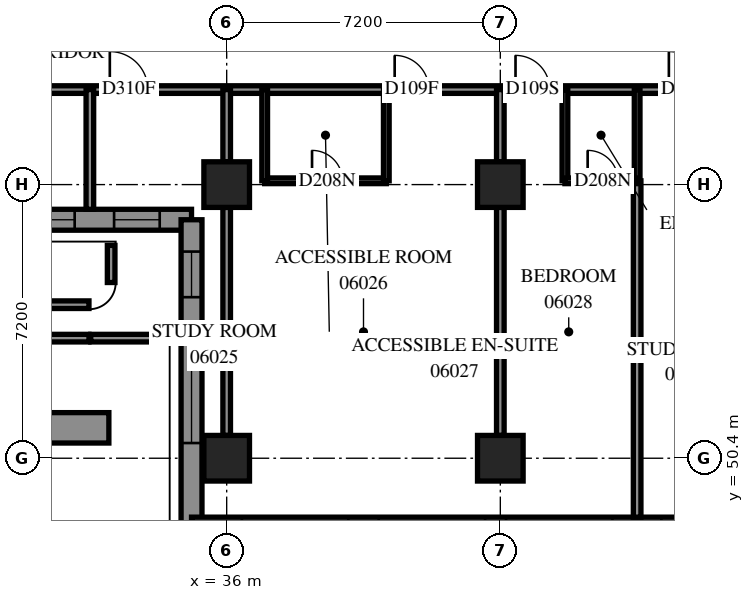
"""IFC4 building model, lengths in metres.
Left out: names, types, materials, properties, quantities, classifications, styles, units other than length and angle.
Written with IfcOpenShell. Run it as: python <this file> out.ifc"""

import sys

from ifc_helpers import new_model, si_unit, direction, frame, frame_2d, origin, origin_2d, place, context, subcontext, project, spatial, polyline, rectangle, outline, extrude, element, fill, save


model = new_model("IFC4")
c1 = context("Model", 3, precision=1e-05, world=origin(), true_north=direction((0.0, 1.0)))
c2 = subcontext(c1, "Body", "Model", "MODEL_VIEW")
j1 = project(units=[si_unit("LENGTHUNIT", "METRE"), si_unit("PLANEANGLEUNIT", "RADIAN")], contexts=[c1])
p1 = place(None, origin())
s1 = spatial("IfcSite", under=j1, at=p1, CompositionType="ELEMENT")
p2 = place(p1, origin())
s2 = spatial("IfcBuilding", under=s1, at=p2, CompositionType="ELEMENT")
p3 = place(p2, frame((0.0, 0.0, 27.0)))
s3 = spatial("IfcBuildingStorey", under=s2, at=p3, CompositionType="ELEMENT", Elevation=27.0)
for number, where, z_axis, x_axis in (
    (1, (36.0, 50.4, 0.0), (0.0, 0.0, 1.0), (1.0, 0.0, 0.0)),
    (2, (36.0, 57.6, 0.0), (0.0, 0.0, 1.0), (1.0, 0.0, 0.0)),
    (3, (43.2, 50.4, 0.0), (0.0, 0.0, 1.0), (1.0, 0.0, 0.0)),
    (4, (43.2, 57.6, 0.0), (0.0, 0.0, 1.0), (1.0, 0.0, 0.0)),
):
    element("IfcColumn", number, at=place(p3, frame(where, z_axis=z_axis, x_axis=x_axis)), inside=s3, PredefinedType="COLUMN", context=c2, shape_type="SweptSolid", body=[
        extrude(rectangle(XDim=1.2, YDim=1.2, at=origin_2d()), origin(), (0.0, 0.0, 1.0), 3.1),
    ])
p4 = place(p3, frame((27.875, 56.675, 0.0), z_axis=(0.0, 0.0, 1.0), x_axis=(1.0, 0.0, 0.0)))
e5 = element("IfcWall", 5, at=p4, inside=s3, PredefinedType="SOLIDWALL", context=c2, shape_type="SweptSolid", body=[
    extrude(outline(polyline([(-0.275, -0.275), (6.925, -0.275), (7.475, 0.275), (0.275, 0.275), (-0.275, -0.275)])), origin(), (0.0, 0.0, 1.0), 3.1),
])
p5 = place(p4, frame((1.325, 0.0, 0.5)))
e6 = element("IfcOpeningElement", 6, at=p5, cuts=e5, PredefinedType="OPENING", context=c2, shape_type="SweptSolid", body=[
    extrude(rectangle(XDim=2.8, YDim=2.45, at=frame_2d((1.4, 1.225))), frame((0.0, 0.285, 0.0), z_axis=(0.0, -1.0, 0.0), x_axis=(1.0, 0.0, 0.0)), (0.0, 0.0, 1.0), 0.57),
])
p6 = place(p4, frame((5.162, 0.0, 0.5)))
e7 = element("IfcOpeningElement", 7, at=p6, cuts=e5, PredefinedType="OPENING", context=c2, shape_type="SweptSolid", body=[
    extrude(rectangle(XDim=1.2, YDim=2.45, at=frame_2d((0.6, 1.225))), frame((0.0, 0.285, 0.0), z_axis=(0.0, -1.0, 0.0), x_axis=(1.0, 0.0, 0.0)), (0.0, 0.0, 1.0), 0.57),
])
p7 = place(p3, frame((35.075, 56.675, 0.0), z_axis=(0.0, 0.0, 1.0), x_axis=(0.0, -1.0, 0.0)))
e8 = element("IfcWall", 8, at=p7, inside=s3, PredefinedType="SOLIDWALL", context=c2, shape_type="SweptSolid", body=[
    extrude(outline(polyline([(0.275, -0.275), (8.375, -0.275), (7.825, 0.275), (-0.275, 0.275), (0.275, -0.275)])), origin(), (0.0, 0.0, 1.0), 3.1),
])
p8 = place(p7, frame((3.075, 0.0, 0.5)))
e9 = element("IfcOpeningElement", 9, at=p8, cuts=e8, PredefinedType="OPENING", context=c2, shape_type="SweptSolid", body=[
    extrude(rectangle(XDim=2.8, YDim=2.45, at=frame_2d((1.4, 1.225))), frame((0.0, 0.285, 0.0), z_axis=(0.0, -1.0, 0.0), x_axis=(1.0, 0.0, 0.0)), (0.0, 0.0, 1.0), 0.57),
])
p9 = place(p7, frame((0.838, 0.0, 0.5)))
e10 = element("IfcOpeningElement", 10, at=p9, cuts=e8, PredefinedType="OPENING", context=c2, shape_type="SweptSolid", body=[
    extrude(rectangle(XDim=1.2, YDim=2.45, at=frame_2d((0.6, 1.225))), frame((0.0, 0.285, 0.0), z_axis=(0.0, -1.0, 0.0), x_axis=(1.0, 0.0, 0.0)), (0.0, 0.0, 1.0), 0.57),
])
p10 = place(p3, frame((35.075, 48.575, 0.0), z_axis=(0.0, 0.0, 1.0), x_axis=(1.0, 0.0, 0.0)))
e11 = element("IfcWall", 11, at=p10, inside=s3, PredefinedType="SOLIDWALL", context=c2, shape_type="SweptSolid", body=[
    extrude(outline(polyline([(-0.275, -0.275), (14.125, -0.275), (14.675, 0.275), (0.275, 0.275), (-0.275, -0.275)])), origin(), (0.0, 0.0, 1.0), 3.1),
])
p11 = place(p10, frame((1.325, 0.0, 0.5)))
e12 = element("IfcOpeningElement", 12, at=p11, cuts=e11, PredefinedType="OPENING", context=c2, shape_type="SweptSolid", body=[
    extrude(rectangle(XDim=2.8, YDim=2.45, at=frame_2d((1.4, 1.225))), frame((0.0, 0.285, 0.0), z_axis=(0.0, -1.0, 0.0), x_axis=(1.0, 0.0, 0.0)), (0.0, 0.0, 1.0), 0.57),
])
p12 = place(p10, frame((4.925, 0.0, 0.5)))
e13 = element("IfcOpeningElement", 13, at=p12, cuts=e11, PredefinedType="OPENING", context=c2, shape_type="SweptSolid", body=[
    extrude(rectangle(XDim=2.8, YDim=2.45, at=frame_2d((1.4, 1.225))), frame((0.0, 0.285, 0.0), z_axis=(0.0, -1.0, 0.0), x_axis=(1.0, 0.0, 0.0)), (0.0, 0.0, 1.0), 0.57),
])
p13 = place(p10, frame((8.275, 0.0, 0.5)))
e14 = element("IfcOpeningElement", 14, at=p13, cuts=e11, PredefinedType="OPENING", context=c2, shape_type="SweptSolid", body=[
    extrude(rectangle(XDim=2.8, YDim=2.45, at=frame_2d((1.4, 1.225))), frame((0.0, 0.285, 0.0), z_axis=(0.0, -1.0, 0.0), x_axis=(1.0, 0.0, 0.0)), (0.0, 0.0, 1.0), 0.57),
])
p14 = place(p10, frame((12.363, 0.0, 0.5)))
e15 = element("IfcOpeningElement", 15, at=p14, cuts=e11, PredefinedType="OPENING", context=c2, shape_type="SweptSolid", body=[
    extrude(rectangle(XDim=1.2, YDim=2.45, at=frame_2d((0.6, 1.225))), frame((0.0, 0.285, 0.0), z_axis=(0.0, -1.0, 0.0), x_axis=(1.0, 0.0, 0.0)), (0.0, 0.0, 1.0), 0.57),
])
p15 = place(p3, frame((28.8, 60.1, 0.0), z_axis=(0.0, 0.0, 1.0), x_axis=(1.0, 0.0, 0.0)))
e16 = element("IfcWall", 16, at=p15, inside=s3, PredefinedType="PARTITIONING", context=c2, shape_type="SweptSolid", body=[
    extrude(rectangle(XDim=24.1, YDim=0.2, at=frame_2d((12.05, 0.0))), origin(), (0.0, 0.0, 1.0), 3.1),
])
p16 = place(p15, frame((4.125, 0.0, 0.0)))
e17 = element("IfcOpeningElement", 17, at=p16, cuts=e16, PredefinedType="OPENING", context=c2, shape_type="SweptSolid", body=[
    extrude(rectangle(XDim=1.0, YDim=2.1, at=frame_2d((0.5, 1.05))), frame((0.0, 0.11, 0.0), z_axis=(0.0, -1.0, 0.0), x_axis=(1.0, 0.0, 0.0)), (0.0, 0.0, 1.0), 0.22),
])
p17 = place(p15, frame((11.62, 0.0, 0.0)))
e18 = element("IfcOpeningElement", 18, at=p17, cuts=e16, PredefinedType="OPENING", context=c2, shape_type="SweptSolid", body=[
    extrude(rectangle(XDim=0.9, YDim=2.1, at=frame_2d((0.45, 1.05))), frame((0.0, 0.11, 0.0), z_axis=(0.0, -1.0, 0.0), x_axis=(1.0, 0.0, 0.0)), (0.0, 0.0, 1.0), 0.22),
])
p18 = place(p15, frame((14.8, 0.0, 0.0)))
e19 = element("IfcOpeningElement", 19, at=p18, cuts=e16, PredefinedType="OPENING", context=c2, shape_type="SweptSolid", body=[
    extrude(rectangle(XDim=0.9, YDim=2.1, at=frame_2d((0.45, 1.05))), frame((0.0, 0.11, 0.0), z_axis=(0.0, -1.0, 0.0), x_axis=(1.0, 0.0, 0.0)), (0.0, 0.0, 1.0), 0.22),
])
p19 = place(p15, frame((18.835, 0.0, 0.0)))
e20 = element("IfcOpeningElement", 20, at=p19, cuts=e16, PredefinedType="OPENING", context=c2, shape_type="SweptSolid", body=[
    extrude(rectangle(XDim=1.0, YDim=2.1, at=frame_2d((0.5, 1.05))), frame((0.0, 0.11, 0.0), z_axis=(0.0, -1.0, 0.0), x_axis=(1.0, 0.0, 0.0)), (0.0, 0.0, 1.0), 0.22),
])
p20 = place(p15, frame((22.854, 0.0, 0.0)))
e21 = element("IfcOpeningElement", 21, at=p20, cuts=e16, PredefinedType="OPENING", context=c2, shape_type="SweptSolid", body=[
    extrude(rectangle(XDim=1.0, YDim=2.1, at=frame_2d((0.5, 1.05))), frame((0.0, 0.11, 0.0), z_axis=(0.0, -1.0, 0.0), x_axis=(1.0, 0.0, 0.0)), (0.0, 0.0, 1.0), 0.22),
])
p21 = place(p3, frame((46.8, 48.85, 0.0), z_axis=(0.0, 0.0, 1.0), x_axis=(0.0, 1.0, 0.0)))
e22 = element("IfcWall", 22, at=p21, inside=s3, PredefinedType="PARTITIONING", context=c2, shape_type="SweptSolid", body=[
    extrude(rectangle(XDim=8.85, YDim=0.2, at=frame_2d((4.425, 0.0))), origin(), (0.0, 0.0, 1.0), 3.1),
])
p22 = place(p3, frame((36.0, 51.0, 0.0), z_axis=(0.0, 0.0, 1.0), x_axis=(0.0, 1.0, 0.0)))
e23 = element("IfcWall", 23, at=p22, inside=s3, PredefinedType="PARTITIONING", context=c2, shape_type="SweptSolid", body=[
    extrude(rectangle(XDim=6.0, YDim=0.2, at=frame_2d((3.0, 0.0))), origin(), (0.0, 0.0, 1.0), 2.6),
])
p23 = place(p3, frame((43.2, 51.0, 0.0), z_axis=(0.0, 0.0, 1.0), x_axis=(0.0, 1.0, 0.0)))
e24 = element("IfcWall", 24, at=p23, inside=s3, PredefinedType="PARTITIONING", context=c2, shape_type="SweptSolid", body=[
    extrude(rectangle(XDim=6.0, YDim=0.2, at=frame_2d((3.0, 0.0))), origin(), (0.0, 0.0, 1.0), 3.1),
])
p24 = place(p3, frame((37.0, 57.7, 0.0), z_axis=(0.0, 0.0, 1.0), x_axis=(1.0, 0.0, 0.0)))
e25 = element("IfcWall", 25, at=p24, inside=s3, PredefinedType="PARTITIONING", context=c2, shape_type="SweptSolid", body=[
    extrude(rectangle(XDim=3.2, YDim=0.15, at=frame_2d((1.6, 0.0))), origin(), (0.0, 0.0, 1.0), 3.1),
])
p25 = place(p24, frame((1.246, 0.0, 0.0)))
e26 = element("IfcOpeningElement", 26, at=p25, cuts=e25, PredefinedType="OPENING", context=c2, shape_type="SweptSolid", body=[
    extrude(rectangle(XDim=0.8, YDim=2.1, at=frame_2d((0.4, 1.05))), frame((0.0, 0.085, 0.0), z_axis=(0.0, -1.0, 0.0), x_axis=(1.0, 0.0, 0.0)), (0.0, 0.0, 1.0), 0.17),
])
p26 = place(p3, frame((32.4, 56.95, 0.0), z_axis=(0.0, 0.0, 1.0), x_axis=(0.0, 1.0, 0.0)))
e27 = element("IfcWall", 27, at=p26, inside=s3, PredefinedType="PARTITIONING", context=c2, shape_type="SweptSolid", body=[
    extrude(rectangle(XDim=3.15, YDim=0.2, at=frame_2d((1.575, 0.0))), origin(), (0.0, 0.0, 1.0), 3.1),
])
for number, where, z_axis, x_axis in (
    (28, (40.2, 57.7, 0.0), (0.0, 0.0, 1.0), (0.0, 1.0, 0.0)),
    (29, (37.0, 57.7, 0.0), (0.0, 0.0, 1.0), (0.0, 1.0, 0.0)),
    (30, (44.9, 57.7, 0.0), (0.0, 0.0, 1.0), (0.0, 1.0, 0.0)),
    (31, (46.8, 57.7, 0.0), (0.0, 0.0, 1.0), (0.0, 1.0, 0.0)),
):
    element("IfcWall", number, at=place(p3, frame(where, z_axis=z_axis, x_axis=x_axis)), inside=s3, PredefinedType="PARTITIONING", context=c2, shape_type="SweptSolid", body=[
        extrude(rectangle(XDim=2.4, YDim=0.15, at=frame_2d((1.2, 0.0))), origin(), (0.0, 0.0, 1.0), 3.1),
    ])
p27 = place(p3, frame((36.0, 58.2, 0.0), z_axis=(0.0, 0.0, 1.0), x_axis=(0.0, 1.0, 0.0)))
e32 = element("IfcWall", 32, at=p27, inside=s3, PredefinedType="PARTITIONING", context=c2, shape_type="SweptSolid", body=[
    extrude(rectangle(XDim=1.9, YDim=0.2, at=frame_2d((0.95, 0.0))), origin(), (0.0, 0.0, 1.0), 3.1),
])
p28 = place(p3, frame((44.9, 57.7, 0.0), z_axis=(0.0, 0.0, 1.0), x_axis=(1.0, 0.0, 0.0)))
e33 = element("IfcWall", 33, at=p28, inside=s3, PredefinedType="PARTITIONING", context=c2, shape_type="SweptSolid", body=[
    extrude(rectangle(XDim=1.9, YDim=0.15, at=frame_2d((0.95, 0.0))), origin(), (0.0, 0.0, 1.0), 3.1),
])
p29 = place(p28, frame((0.598, 0.0, 0.0)))
e34 = element("IfcOpeningElement", 34, at=p29, cuts=e33, PredefinedType="OPENING", context=c2, shape_type="SweptSolid", body=[
    extrude(rectangle(XDim=0.8, YDim=2.1, at=frame_2d((0.4, 1.05))), frame((0.0, 0.085, 0.0), z_axis=(0.0, -1.0, 0.0), x_axis=(1.0, 0.0, 0.0)), (0.0, 0.0, 1.0), 0.17),
])
p30 = place(p3, frame((43.2, 58.2, 0.0), z_axis=(0.0, 0.0, 1.0), x_axis=(0.0, 1.0, 0.0)))
e35 = element("IfcWall", 35, at=p30, inside=s3, PredefinedType="PARTITIONING", context=c2, shape_type="SweptSolid", body=[
    extrude(rectangle(XDim=1.9, YDim=0.2, at=frame_2d((0.95, 0.0))), origin(), (0.0, 0.0, 1.0), 3.1),
])
p31 = place(p3, frame((32.96, 56.0, 0.0), z_axis=(0.0, 0.0, 1.0), x_axis=(0.0, -1.0, 0.0)))
e36 = element("IfcWall", 36, at=p31, inside=s3, PredefinedType="PARAPET", context=c2, shape_type="SweptSolid", body=[
    extrude(rectangle(XDim=0.976, YDim=0.2, at=frame_2d((0.488, 0.0))), origin(), (0.0, 0.0, 1.0), 0.9),
])
for number, where, z_axis, x_axis in (
    (37, (32.376, 54.44, 0.0), (0.0, 0.0, 1.0), (-1.0, 0.0, 0.0)),
    (38, (31.3, 53.56, 0.0), (0.0, 0.0, 1.0), (1.0, 0.0, 0.0)),
):
    element("IfcWall", number, at=place(p3, frame(where, z_axis=z_axis, x_axis=x_axis)), inside=s3, PredefinedType="PARAPET", context=c2, shape_type="SweptSolid", body=[
        extrude(rectangle(XDim=1.076, YDim=0.2, at=frame_2d((0.538, 0.0))), origin(), (0.0, 0.0, 1.0), 0.9),
    ])
p32 = place(p3, frame((32.424, 53.56, 0.0), z_axis=(0.0, 0.0, 1.0), x_axis=(1.0, 0.0, 0.0)))
e39 = element("IfcWall", 39, at=p32, inside=s3, PredefinedType="PARAPET", context=c2, shape_type="SweptSolid", body=[
    extrude(rectangle(XDim=1.976, YDim=0.2, at=frame_2d((0.988, 0.0))), origin(), (0.0, 0.0, 1.0), 0.9),
])
p33 = place(p3, frame((0.4, 51.2, 0.0), z_axis=(0.0, 0.0, 1.0), x_axis=(1.0, 0.0, 0.0)))
e40 = element("IfcWall", 40, at=p33, inside=s3, PredefinedType="SOLIDWALL", context=c2, shape_type="SweptSolid", body=[
    extrude(rectangle(XDim=32.5, YDim=0.8, at=frame_2d((16.25, 0.0))), origin(), (0.0, 0.0, 1.0), 0.6),
])
p34 = place(p5, origin())
e41 = element("IfcWindow", 41, at=p34, inside=s3, PartitioningType="SINGLE_PANEL", PredefinedType="WINDOW", context=c2, shape_type="SweptSolid", body=[
    extrude(rectangle(XDim=2.8, YDim=2.45, at=frame_2d((1.4, 1.225))), frame((0.0, 0.155, 0.0), z_axis=(0.0, -1.0, 0.0), x_axis=(1.0, 0.0, 0.0)), (0.0, 0.0, 1.0), 0.06),
])
fill(e6, e41)
p35 = place(p6, origin())
e42 = element("IfcWindow", 42, at=p35, inside=s3, PartitioningType="SINGLE_PANEL", PredefinedType="WINDOW", context=c2, shape_type="SweptSolid", body=[
    extrude(rectangle(XDim=1.2, YDim=2.45, at=frame_2d((0.6, 1.225))), frame((0.0, 0.155, 0.0), z_axis=(0.0, -1.0, 0.0), x_axis=(1.0, 0.0, 0.0)), (0.0, 0.0, 1.0), 0.06),
])
fill(e7, e42)
p36 = place(p8, origin())
e43 = element("IfcWindow", 43, at=p36, inside=s3, PartitioningType="SINGLE_PANEL", PredefinedType="WINDOW", context=c2, shape_type="SweptSolid", body=[
    extrude(rectangle(XDim=2.8, YDim=2.45, at=frame_2d((1.4, 1.225))), frame((0.0, 0.155, 0.0), z_axis=(0.0, -1.0, 0.0), x_axis=(1.0, 0.0, 0.0)), (0.0, 0.0, 1.0), 0.06),
])
fill(e9, e43)
p37 = place(p9, origin())
e44 = element("IfcWindow", 44, at=p37, inside=s3, PartitioningType="SINGLE_PANEL", PredefinedType="WINDOW", context=c2, shape_type="SweptSolid", body=[
    extrude(rectangle(XDim=1.2, YDim=2.45, at=frame_2d((0.6, 1.225))), frame((0.0, 0.155, 0.0), z_axis=(0.0, -1.0, 0.0), x_axis=(1.0, 0.0, 0.0)), (0.0, 0.0, 1.0), 0.06),
])
fill(e10, e44)
p38 = place(p16, origin())
e45 = element("IfcDoor", 45, at=p38, inside=s3, OperationType="SINGLE_SWING_RIGHT", PredefinedType="DOOR", context=c2, shape_type="SweptSolid", body=[
    extrude(rectangle(XDim=1.0, YDim=2.1, at=frame_2d((0.5, 1.05))), frame((0.0, 0.025, 0.0), z_axis=(0.0, -1.0, 0.0), x_axis=(1.0, 0.0, 0.0)), (0.0, 0.0, 1.0), 0.05),
])
fill(e17, e45)
p39 = place(p17, origin())
e46 = element("IfcDoor", 46, at=p39, inside=s3, OperationType="SINGLE_SWING_LEFT", PredefinedType="DOOR", context=c2, shape_type="SweptSolid", body=[
    extrude(rectangle(XDim=0.9, YDim=2.1, at=frame_2d((0.45, 1.05))), frame((0.0, 0.025, 0.0), z_axis=(0.0, -1.0, 0.0), x_axis=(1.0, 0.0, 0.0)), (0.0, 0.0, 1.0), 0.05),
])
fill(e18, e46)
p40 = place(p25, origin())
e47 = element("IfcDoor", 47, at=p40, inside=s3, OperationType="SINGLE_SWING_RIGHT", PredefinedType="DOOR", context=c2, shape_type="SweptSolid", body=[
    extrude(rectangle(XDim=0.8, YDim=2.1, at=frame_2d((0.4, 1.05))), frame((0.0, 0.025, 0.0), z_axis=(0.0, -1.0, 0.0), x_axis=(1.0, 0.0, 0.0)), (0.0, 0.0, 1.0), 0.05),
])
fill(e26, e47)
p41 = place(p18, origin())
e48 = element("IfcDoor", 48, at=p41, inside=s3, OperationType="SINGLE_SWING_LEFT", PredefinedType="DOOR", context=c2, shape_type="SweptSolid", body=[
    extrude(rectangle(XDim=0.9, YDim=2.1, at=frame_2d((0.45, 1.05))), frame((0.0, 0.025, 0.0), z_axis=(0.0, -1.0, 0.0), x_axis=(1.0, 0.0, 0.0)), (0.0, 0.0, 1.0), 0.05),
])
fill(e19, e48)
p42 = place(p29, origin())
e49 = element("IfcDoor", 49, at=p42, inside=s3, OperationType="SINGLE_SWING_RIGHT", PredefinedType="DOOR", context=c2, shape_type="SweptSolid", body=[
    extrude(rectangle(XDim=0.8, YDim=2.1, at=frame_2d((0.4, 1.05))), frame((0.0, 0.025, 0.0), z_axis=(0.0, -1.0, 0.0), x_axis=(1.0, 0.0, 0.0)), (0.0, 0.0, 1.0), 0.05),
])
fill(e34, e49)
p43 = place(p19, origin())
e50 = element("IfcDoor", 50, at=p43, inside=s3, OperationType="SINGLE_SWING_RIGHT", PredefinedType="DOOR", context=c2, shape_type="SweptSolid", body=[
    extrude(rectangle(XDim=1.0, YDim=2.1, at=frame_2d((0.5, 1.05))), frame((0.0, 0.025, 0.0), z_axis=(0.0, -1.0, 0.0), x_axis=(1.0, 0.0, 0.0)), (0.0, 0.0, 1.0), 0.05),
])
fill(e20, e50)
save(model, sys.argv[1])
